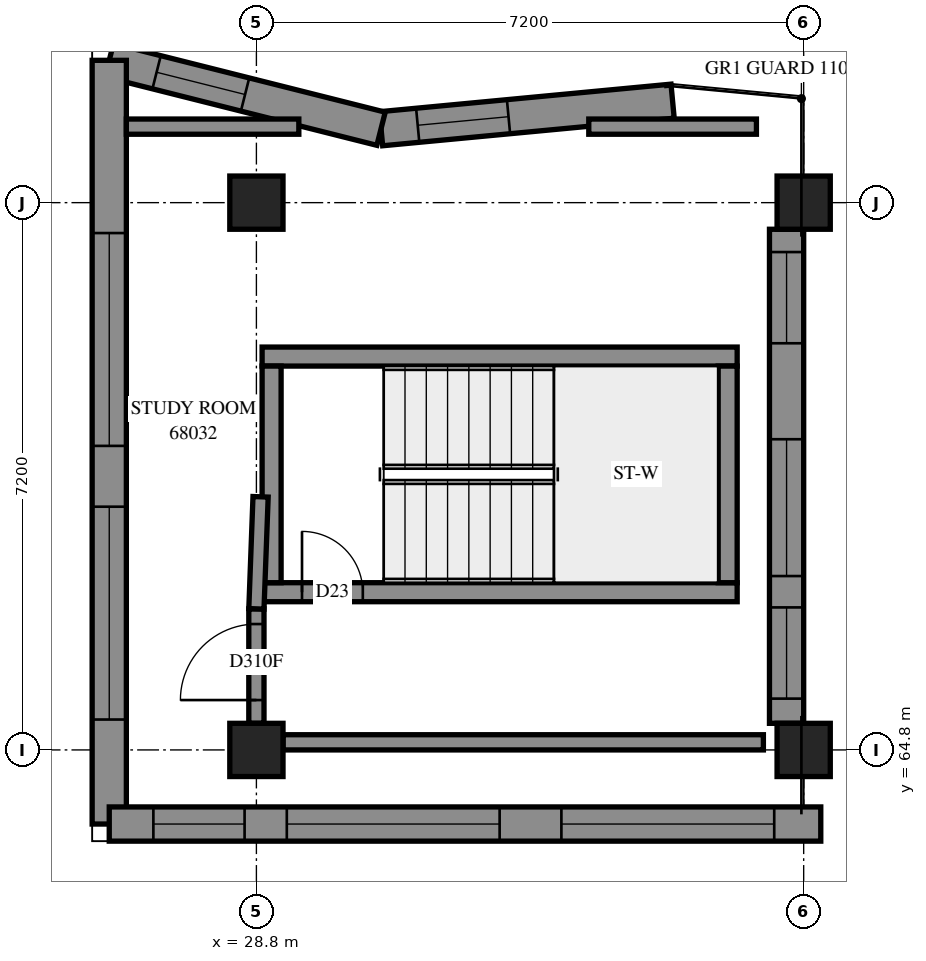
"""IFC4 building model, lengths in metres.
Left out: names, types, materials, properties, quantities, classifications, styles, units other than length and angle.
Written with IfcOpenShell. Run it as: python <this file> out.ifc"""

import sys

from ifc_helpers import new_model, si_unit, direction, frame, frame_2d, origin, origin_2d, place, context, subcontext, project, spatial, polyline, rectangle, outline, extrude, element, fill, save


model = new_model("IFC4")
c1 = context("Model", 3, precision=1e-05, world=origin(), true_north=direction((0.0, 1.0)))
c2 = subcontext(c1, "Body", "Model", "MODEL_VIEW")
j1 = project(units=[si_unit("LENGTHUNIT", "METRE"), si_unit("PLANEANGLEUNIT", "RADIAN")], contexts=[c1])
p1 = place(None, origin())
s1 = spatial("IfcSite", under=j1, at=p1, CompositionType="ELEMENT")
p2 = place(p1, origin())
s2 = spatial("IfcBuilding", under=s1, at=p2, CompositionType="ELEMENT")
p3 = place(p2, frame((0.0, 0.0, 250.6)))
s3 = spatial("IfcBuildingStorey", under=s2, at=p3, CompositionType="ELEMENT", Elevation=250.6)
for number, where, z_axis, x_axis in (
    (1, (28.8, 64.8, 0.0), (0.0, 0.0, 1.0), (1.0, 0.0, 0.0)),
    (2, (28.8, 72.0, 0.0), (0.0, 0.0, 1.0), (1.0, 0.0, 0.0)),
    (3, (36.0, 64.8, 0.0), (0.0, 0.0, 1.0), (1.0, 0.0, 0.0)),
    (4, (36.0, 72.0, 0.0), (0.0, 0.0, 1.0), (1.0, 0.0, 0.0)),
):
    element("IfcColumn", number, at=place(p3, frame(where, z_axis=z_axis, x_axis=x_axis)), inside=s3, PredefinedType="COLUMN", context=c2, shape_type="SweptSolid", body=[
        extrude(rectangle(XDim=0.7, YDim=0.7, at=origin_2d()), origin(), (0.0, 0.0, 1.0), 3.1),
    ])
p4 = place(p3, frame((34.276, 73.335, 0.0), z_axis=(0.0, 0.0, 1.0), x_axis=(-0.995561488, -0.0941133549, 0.0)))
e5 = element("IfcWall", 5, at=p4, inside=s3, PredefinedType="SOLIDWALL", context=c2, shape_type="SweptSolid", body=[
    extrude(outline(polyline([(-0.021, -0.225), (3.814, -0.225), (3.892, 0.225), (0.021, 0.225), (-0.021, -0.225)])), origin(), (0.0, 0.0, 1.0), 3.1),
])
p5 = place(p4, frame((2.168, 0.0, 0.45)))
e6 = element("IfcOpeningElement", 6, at=p5, cuts=e5, PredefinedType="OPENING", context=c2, shape_type="SweptSolid", body=[
    extrude(rectangle(XDim=1.2, YDim=2.55, at=frame_2d((0.6, 1.275))), frame((0.0, 0.235, 0.0), z_axis=(0.0, -1.0, 0.0), x_axis=(1.0, 0.0, 0.0)), (0.0, 0.0, 1.0), 0.47),
])
p6 = place(p3, frame((30.44, 72.972, 0.0), z_axis=(0.0, 0.0, 1.0), x_axis=(-0.9697568262, 0.2440731406, 0.0)))
e7 = element("IfcWall", 7, at=p6, inside=s3, PredefinedType="SOLIDWALL", context=c2, shape_type="SweptSolid", body=[
    extrude(outline(polyline([(0.039, -0.225), (3.976, -0.225), (3.399, 0.225), (-0.039, 0.225), (0.039, -0.225)])), origin(), (0.0, 0.0, 1.0), 3.1),
])
p7 = place(p6, frame((1.845, 0.0, 0.45)))
e8 = element("IfcOpeningElement", 8, at=p7, cuts=e7, PredefinedType="OPENING", context=c2, shape_type="SweptSolid", body=[
    extrude(rectangle(XDim=1.2, YDim=2.55, at=frame_2d((0.6, 1.275))), frame((0.0, 0.235, 0.0), z_axis=(0.0, -1.0, 0.0), x_axis=(1.0, 0.0, 0.0)), (0.0, 0.0, 1.0), 0.47),
])
p8 = place(p3, frame((26.864, 73.872, 0.0), z_axis=(0.0, 0.0, 1.0), x_axis=(0.0, -1.0, 0.0)))
e9 = element("IfcWall", 9, at=p8, inside=s3, PredefinedType="SOLIDWALL", context=c2, shape_type="SweptSolid", body=[
    extrude(outline(polyline([(-0.289, -0.225), (10.272, -0.225), (9.822, 0.225), (0.289, 0.225), (-0.289, -0.225)])), origin(), (0.0, 0.0, 1.0), 3.1),
])
p9 = place(p8, frame((2.272, 0.0, 0.45)))
e10 = element("IfcOpeningElement", 10, at=p9, cuts=e9, PredefinedType="OPENING", context=c2, shape_type="SweptSolid", body=[
    extrude(rectangle(XDim=2.8, YDim=2.55, at=frame_2d((1.4, 1.275))), frame((0.0, 0.235, 0.0), z_axis=(0.0, -1.0, 0.0), x_axis=(1.0, 0.0, 0.0)), (0.0, 0.0, 1.0), 0.47),
])
p10 = place(p8, frame((5.872, 0.0, 0.45)))
e11 = element("IfcOpeningElement", 11, at=p10, cuts=e9, PredefinedType="OPENING", context=c2, shape_type="SweptSolid", body=[
    extrude(rectangle(XDim=2.8, YDim=2.55, at=frame_2d((1.4, 1.275))), frame((0.0, 0.235, 0.0), z_axis=(0.0, -1.0, 0.0), x_axis=(1.0, 0.0, 0.0)), (0.0, 0.0, 1.0), 0.47),
])
p11 = place(p3, frame((26.864, 63.825, 0.0), z_axis=(0.0, 0.0, 1.0), x_axis=(1.0, 0.0, 0.0)))
e12 = element("IfcWall", 12, at=p11, inside=s3, PredefinedType="SOLIDWALL", context=c2, shape_type="SweptSolid", body=[
    extrude(outline(polyline([(-0.225, -0.225), (9.136, -0.225), (9.586, 0.225), (0.225, 0.225), (-0.225, -0.225)])), origin(), (0.0, 0.0, 1.0), 3.1),
])
p12 = place(p11, frame((2.336, 0.0, 0.45)))
e13 = element("IfcOpeningElement", 13, at=p12, cuts=e12, PredefinedType="OPENING", context=c2, shape_type="SweptSolid", body=[
    extrude(rectangle(XDim=2.8, YDim=2.55, at=frame_2d((1.4, 1.275))), frame((0.0, 0.235, 0.0), z_axis=(0.0, -1.0, 0.0), x_axis=(1.0, 0.0, 0.0)), (0.0, 0.0, 1.0), 0.47),
])
p13 = place(p11, frame((5.949, 0.0, 0.45)))
e14 = element("IfcOpeningElement", 14, at=p13, cuts=e12, PredefinedType="OPENING", context=c2, shape_type="SweptSolid", body=[
    extrude(rectangle(XDim=2.8, YDim=2.55, at=frame_2d((1.4, 1.275))), frame((0.0, 0.235, 0.0), z_axis=(0.0, -1.0, 0.0), x_axis=(1.0, 0.0, 0.0)), (0.0, 0.0, 1.0), 0.47),
])
p14 = place(p11, frame((0.581, 0.0, 0.45)))
e15 = element("IfcOpeningElement", 15, at=p14, cuts=e12, PredefinedType="OPENING", context=c2, shape_type="SweptSolid", body=[
    extrude(rectangle(XDim=1.2, YDim=2.55, at=frame_2d((0.6, 1.275))), frame((0.0, 0.235, 0.0), z_axis=(0.0, -1.0, 0.0), x_axis=(1.0, 0.0, 0.0)), (0.0, 0.0, 1.0), 0.47),
])
p15 = place(p3, frame((35.775, 65.15, 0.0), z_axis=(0.0, 0.0, 1.0), x_axis=(0.0, 1.0, 0.0)))
e16 = element("IfcWall", 16, at=p15, inside=s3, PredefinedType="SOLIDWALL", context=c2, shape_type="SweptSolid", body=[
    extrude(rectangle(XDim=6.5, YDim=0.45, at=frame_2d((3.25, 0.0))), origin(), (0.0, 0.0, 1.0), 3.1),
])
p16 = place(p15, frame((0.325, 0.0, 0.6)))
e17 = element("IfcOpeningElement", 17, at=p16, cuts=e16, PredefinedType="OPENING", context=c2, shape_type="SweptSolid", body=[
    extrude(rectangle(XDim=1.2, YDim=1.9, at=frame_2d((0.6, 0.95))), frame((0.0, 0.235, 0.0), z_axis=(0.0, -1.0, 0.0), x_axis=(1.0, 0.0, 0.0)), (0.0, 0.0, 1.0), 0.47),
])
p17 = place(p15, frame((1.938, 0.0, 0.7)))
e18 = element("IfcOpeningElement", 18, at=p17, cuts=e16, PredefinedType="OPENING", context=c2, shape_type="SweptSolid", body=[
    extrude(rectangle(XDim=1.8, YDim=1.8, at=frame_2d((0.9, 0.9))), frame((0.0, 0.235, 0.0), z_axis=(0.0, -1.0, 0.0), x_axis=(1.0, 0.0, 0.0)), (0.0, 0.0, 1.0), 0.47),
])
p18 = place(p15, frame((5.0, 0.0, 0.6)))
e19 = element("IfcOpeningElement", 19, at=p18, cuts=e16, PredefinedType="OPENING", context=c2, shape_type="SweptSolid", body=[
    extrude(rectangle(XDim=1.2, YDim=1.9, at=frame_2d((0.6, 0.95))), frame((0.0, 0.235, 0.0), z_axis=(0.0, -1.0, 0.0), x_axis=(1.0, 0.0, 0.0)), (0.0, 0.0, 1.0), 0.47),
])
p19 = place(p3, frame((28.875, 66.875, -0.3), z_axis=(0.0, 0.0, 1.0), x_axis=(1.0, 0.0, 0.0)))
e20 = element("IfcWall", 20, at=p19, inside=s3, PredefinedType="SOLIDWALL", context=c2, shape_type="SweptSolid", body=[
    extrude(rectangle(XDim=6.25, YDim=0.25, at=frame_2d((3.125, 0.0))), origin(), (0.0, 0.0, 1.0), 3.4),
])
p20 = place(p19, frame((0.525, 0.0, 0.3)))
e21 = element("IfcOpeningElement", 21, at=p20, cuts=e20, PredefinedType="OPENING", context=c2, shape_type="SweptSolid", body=[
    extrude(rectangle(XDim=0.8, YDim=2.1, at=frame_2d((0.4, 1.05))), frame((0.0, 0.135, 0.0), z_axis=(0.0, -1.0, 0.0), x_axis=(1.0, 0.0, 0.0)), (0.0, 0.0, 1.0), 0.27),
])
p21 = place(p3, frame((28.875, 69.975, -0.3), z_axis=(0.0, 0.0, 1.0), x_axis=(1.0, 0.0, 0.0)))
e22 = element("IfcWall", 22, at=p21, inside=s3, PredefinedType="SOLIDWALL", context=c2, shape_type="SweptSolid", body=[
    extrude(rectangle(XDim=6.25, YDim=0.25, at=frame_2d((3.125, 0.0))), origin(), (0.0, 0.0, 1.0), 3.4),
])
for number, where, z_axis, x_axis in (
    (23, (29.0, 67.0, -0.3), (0.0, 0.0, 1.0), (0.0, 1.0, 0.0)),
    (24, (35.0, 67.0, -0.3), (0.0, 0.0, 1.0), (0.0, 1.0, 0.0)),
):
    element("IfcWall", number, at=place(p3, frame(where, z_axis=z_axis, x_axis=x_axis)), inside=s3, PredefinedType="SOLIDWALL", context=c2, shape_type="SweptSolid", body=[
        extrude(rectangle(XDim=2.85, YDim=0.25, at=frame_2d((1.425, 0.0))), origin(), (0.0, 0.0, 1.0), 3.4),
    ])
p22 = place(p3, frame((29.15, 64.9, 0.0), z_axis=(0.0, 0.0, 1.0), x_axis=(1.0, 0.0, 0.0)))
e25 = element("IfcWall", 25, at=p22, inside=s3, PredefinedType="PARTITIONING", context=c2, shape_type="SweptSolid", body=[
    extrude(rectangle(XDim=6.32, YDim=0.2, at=frame_2d((3.16, 0.0))), origin(), (0.0, 0.0, 1.0), 2.6),
])
p23 = place(p3, frame((27.089, 73.0, 0.0), z_axis=(0.0, 0.0, 1.0), x_axis=(1.0, 0.0, 0.0)))
e26 = element("IfcWall", 26, at=p23, inside=s3, PredefinedType="PARTITIONING", context=c2, shape_type="SweptSolid", body=[
    extrude(rectangle(XDim=2.269, YDim=0.2, at=frame_2d((1.135, 0.0))), origin(), (0.0, 0.0, 1.0), 3.1),
])
p24 = place(p3, frame((33.173, 73.0, 0.0), z_axis=(0.0, 0.0, 1.0), x_axis=(1.0, 0.0, 0.0)))
e27 = element("IfcWall", 27, at=p24, inside=s3, PredefinedType="PARTITIONING", context=c2, shape_type="SweptSolid", body=[
    extrude(rectangle(XDim=2.206, YDim=0.2, at=frame_2d((1.103, 0.0))), origin(), (0.0, 0.0, 1.0), 3.1),
])
p25 = place(p3, frame((28.8, 65.15, 0.0), z_axis=(0.0, 0.0, 1.0), x_axis=(0.0, 1.0, 0.0)))
e28 = element("IfcWall", 28, at=p25, inside=s3, PredefinedType="PARTITIONING", context=c2, shape_type="SweptSolid", body=[
    extrude(rectangle(XDim=1.506, YDim=0.2, at=frame_2d((0.753, 0.0))), origin(), (0.0, 0.0, 1.0), 2.6),
])
p26 = place(p25, frame((0.306, 0.0, 0.0)))
e29 = element("IfcOpeningElement", 29, at=p26, cuts=e28, PredefinedType="OPENING", context=c2, shape_type="SweptSolid", body=[
    extrude(rectangle(XDim=1.0, YDim=2.1, at=frame_2d((0.5, 1.05))), frame((0.0, 0.11, 0.0), z_axis=(0.0, -1.0, 0.0), x_axis=(1.0, 0.0, 0.0)), (0.0, 0.0, 1.0), 0.22),
])
p27 = place(p3, frame((28.855, 68.13, 0.0), z_axis=(0.0, 0.0, 1.0), x_axis=(-0.0372874843, -0.99930458, 0.0)))
e30 = element("IfcWall", 30, at=p27, inside=s3, PredefinedType="PARTITIONING", context=c2, shape_type="SweptSolid", body=[
    extrude(rectangle(XDim=1.475, YDim=0.2, at=frame_2d((0.738, 0.0))), origin(), (0.0, 0.0, 1.0), 2.6),
])
p28 = place(p5, origin())
e31 = element("IfcWindow", 31, at=p28, inside=s3, PartitioningType="SINGLE_PANEL", PredefinedType="WINDOW", context=c2, shape_type="SweptSolid", body=[
    extrude(rectangle(XDim=1.2, YDim=2.55, at=frame_2d((0.6, 1.275))), frame((0.0, 0.205, 0.0), z_axis=(0.0, -1.0, 0.0), x_axis=(1.0, 0.0, 0.0)), (0.0, 0.0, 1.0), 0.06),
])
fill(e6, e31)
p29 = place(p7, origin())
e32 = element("IfcWindow", 32, at=p29, inside=s3, PartitioningType="SINGLE_PANEL", PredefinedType="WINDOW", context=c2, shape_type="SweptSolid", body=[
    extrude(rectangle(XDim=1.2, YDim=2.55, at=frame_2d((0.6, 1.275))), frame((0.0, 0.205, 0.0), z_axis=(0.0, -1.0, 0.0), x_axis=(1.0, 0.0, 0.0)), (0.0, 0.0, 1.0), 0.06),
])
fill(e8, e32)
p30 = place(p9, origin())
e33 = element("IfcWindow", 33, at=p30, inside=s3, PartitioningType="SINGLE_PANEL", PredefinedType="WINDOW", context=c2, shape_type="SweptSolid", body=[
    extrude(rectangle(XDim=2.8, YDim=2.55, at=frame_2d((1.4, 1.275))), frame((0.0, 0.205, 0.0), z_axis=(0.0, -1.0, 0.0), x_axis=(1.0, 0.0, 0.0)), (0.0, 0.0, 1.0), 0.06),
])
fill(e10, e33)
p31 = place(p10, origin())
e34 = element("IfcWindow", 34, at=p31, inside=s3, PartitioningType="SINGLE_PANEL", PredefinedType="WINDOW", context=c2, shape_type="SweptSolid", body=[
    extrude(rectangle(XDim=2.8, YDim=2.55, at=frame_2d((1.4, 1.275))), frame((0.0, 0.205, 0.0), z_axis=(0.0, -1.0, 0.0), x_axis=(1.0, 0.0, 0.0)), (0.0, 0.0, 1.0), 0.06),
])
fill(e11, e34)
p32 = place(p12, origin())
e35 = element("IfcWindow", 35, at=p32, inside=s3, PartitioningType="SINGLE_PANEL", PredefinedType="WINDOW", context=c2, shape_type="SweptSolid", body=[
    extrude(rectangle(XDim=2.8, YDim=2.55, at=frame_2d((1.4, 1.275))), frame((0.0, 0.205, 0.0), z_axis=(0.0, -1.0, 0.0), x_axis=(1.0, 0.0, 0.0)), (0.0, 0.0, 1.0), 0.06),
])
fill(e13, e35)
p33 = place(p13, origin())
e36 = element("IfcWindow", 36, at=p33, inside=s3, PartitioningType="SINGLE_PANEL", PredefinedType="WINDOW", context=c2, shape_type="SweptSolid", body=[
    extrude(rectangle(XDim=2.8, YDim=2.55, at=frame_2d((1.4, 1.275))), frame((0.0, 0.205, 0.0), z_axis=(0.0, -1.0, 0.0), x_axis=(1.0, 0.0, 0.0)), (0.0, 0.0, 1.0), 0.06),
])
fill(e14, e36)
p34 = place(p14, origin())
e37 = element("IfcWindow", 37, at=p34, inside=s3, PartitioningType="SINGLE_PANEL", PredefinedType="WINDOW", context=c2, shape_type="SweptSolid", body=[
    extrude(rectangle(XDim=1.2, YDim=2.55, at=frame_2d((0.6, 1.275))), frame((0.0, 0.205, 0.0), z_axis=(0.0, -1.0, 0.0), x_axis=(1.0, 0.0, 0.0)), (0.0, 0.0, 1.0), 0.06),
])
fill(e15, e37)
p35 = place(p20, origin())
e38 = element("IfcDoor", 38, at=p35, inside=s3, OperationType="SINGLE_SWING_LEFT", PredefinedType="DOOR", context=c2, shape_type="SweptSolid", body=[
    extrude(rectangle(XDim=0.8, YDim=2.1, at=frame_2d((0.4, 1.05))), frame((0.0, 0.025, 0.0), z_axis=(0.0, -1.0, 0.0), x_axis=(1.0, 0.0, 0.0)), (0.0, 0.0, 1.0), 0.05),
])
fill(e21, e38)
p36 = place(p26, origin())
e39 = element("IfcDoor", 39, at=p36, inside=s3, OperationType="SINGLE_SWING_RIGHT", PredefinedType="DOOR", context=c2, shape_type="SweptSolid", body=[
    extrude(rectangle(XDim=1.0, YDim=2.1, at=frame_2d((0.5, 1.05))), frame((0.0, 0.025, 0.0), z_axis=(0.0, -1.0, 0.0), x_axis=(1.0, 0.0, 0.0)), (0.0, 0.0, 1.0), 0.05),
])
fill(e29, e39)
p37 = place(p16, origin())
e40 = element("IfcWindow", 40, at=p37, inside=s3, PartitioningType="SINGLE_PANEL", PredefinedType="WINDOW", context=c2, shape_type="SweptSolid", body=[
    extrude(rectangle(XDim=1.2, YDim=1.9, at=frame_2d((0.6, 0.95))), frame((0.0, 0.205, 0.0), z_axis=(0.0, -1.0, 0.0), x_axis=(1.0, 0.0, 0.0)), (0.0, 0.0, 1.0), 0.06),
])
fill(e17, e40)
p38 = place(p17, origin())
e41 = element("IfcWindow", 41, at=p38, inside=s3, PartitioningType="SINGLE_PANEL", PredefinedType="WINDOW", context=c2, shape_type="SweptSolid", body=[
    extrude(rectangle(XDim=1.8, YDim=1.8, at=frame_2d((0.9, 0.9))), frame((0.0, 0.205, 0.0), z_axis=(0.0, -1.0, 0.0), x_axis=(1.0, 0.0, 0.0)), (0.0, 0.0, 1.0), 0.06),
])
fill(e18, e41)
p39 = place(p18, origin())
e42 = element("IfcWindow", 42, at=p39, inside=s3, PartitioningType="SINGLE_PANEL", PredefinedType="WINDOW", context=c2, shape_type="SweptSolid", body=[
    extrude(rectangle(XDim=1.2, YDim=1.9, at=frame_2d((0.6, 0.95))), frame((0.0, 0.205, 0.0), z_axis=(0.0, -1.0, 0.0), x_axis=(1.0, 0.0, 0.0)), (0.0, 0.0, 1.0), 0.06),
])
fill(e19, e42)
save(model, sys.argv[1])
